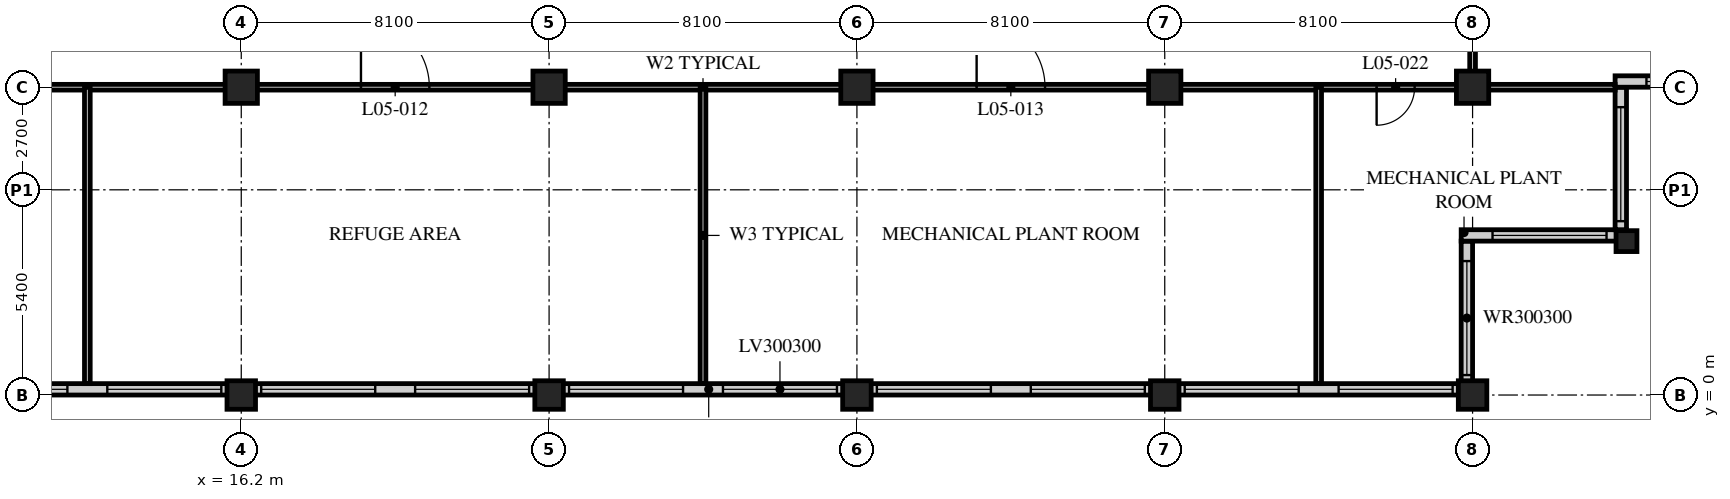
"""IFC4 building model, lengths in metres.
Left out: names, types, materials, properties, quantities, classifications, styles, units other than length and angle.
Written with IfcOpenShell. Run it as: python <this file> out.ifc"""

import sys

from ifc_helpers import new_model, si_unit, direction, frame, frame_2d, origin, origin_2d, place, context, subcontext, project, spatial, rectangle, hollow_rectangle, extrude, element, fill, save


model = new_model("IFC4")
c1 = context("Model", 3, precision=1e-05, world=origin(), true_north=direction((0.0, 1.0)))
c2 = subcontext(c1, "Body", "Model", "MODEL_VIEW")
j1 = project(units=[si_unit("LENGTHUNIT", "METRE"), si_unit("PLANEANGLEUNIT", "RADIAN")], contexts=[c1])
p1 = place(None, origin())
s1 = spatial("IfcSite", under=j1, at=p1, CompositionType="ELEMENT")
p2 = place(p1, origin())
s2 = spatial("IfcBuilding", under=s1, at=p2, CompositionType="ELEMENT")
p3 = place(p2, frame((0.0, 0.0, 27.6)))
s3 = spatial("IfcBuildingStorey", under=s2, at=p3, CompositionType="ELEMENT", Elevation=27.6)
p4 = place(p3, frame((16.2, 0.0, 0.0), z_axis=(0.0, 0.0, 1.0), x_axis=(1.0, 0.0, 0.0)))
e1 = element("IfcColumn", 1, at=p4, inside=s3, PredefinedType="COLUMN", context=c2, shape_type="SweptSolid", body=[
    extrude(hollow_rectangle(XDim=0.75, YDim=0.75, WallThickness=0.07, at=origin_2d()), origin(), (0.0, 0.0, 1.0), 5.4),
])
p5 = place(p3, frame((16.2, 8.1, 0.0), z_axis=(0.0, 0.0, 1.0), x_axis=(1.0, 0.0, 0.0)))
e2 = element("IfcColumn", 2, at=p5, inside=s3, PredefinedType="COLUMN", context=c2, shape_type="SweptSolid", body=[
    extrude(hollow_rectangle(XDim=0.85, YDim=0.85, WallThickness=0.085, at=origin_2d()), origin(), (0.0, 0.0, 1.0), 5.4),
])
p6 = place(p3, frame((24.3, 0.0, 0.0), z_axis=(0.0, 0.0, 1.0), x_axis=(1.0, 0.0, 0.0)))
e3 = element("IfcColumn", 3, at=p6, inside=s3, PredefinedType="COLUMN", context=c2, shape_type="SweptSolid", body=[
    extrude(hollow_rectangle(XDim=0.75, YDim=0.75, WallThickness=0.07, at=origin_2d()), origin(), (0.0, 0.0, 1.0), 5.4),
])
p7 = place(p3, frame((24.3, 8.1, 0.0), z_axis=(0.0, 0.0, 1.0), x_axis=(1.0, 0.0, 0.0)))
e4 = element("IfcColumn", 4, at=p7, inside=s3, PredefinedType="COLUMN", context=c2, shape_type="SweptSolid", body=[
    extrude(hollow_rectangle(XDim=0.85, YDim=0.85, WallThickness=0.085, at=origin_2d()), origin(), (0.0, 0.0, 1.0), 5.4),
])
p8 = place(p3, frame((32.4, 0.0, 0.0), z_axis=(0.0, 0.0, 1.0), x_axis=(1.0, 0.0, 0.0)))
e5 = element("IfcColumn", 5, at=p8, inside=s3, PredefinedType="COLUMN", context=c2, shape_type="SweptSolid", body=[
    extrude(hollow_rectangle(XDim=0.75, YDim=0.75, WallThickness=0.07, at=origin_2d()), origin(), (0.0, 0.0, 1.0), 5.4),
])
p9 = place(p3, frame((32.4, 8.1, 0.0), z_axis=(0.0, 0.0, 1.0), x_axis=(1.0, 0.0, 0.0)))
e6 = element("IfcColumn", 6, at=p9, inside=s3, PredefinedType="COLUMN", context=c2, shape_type="SweptSolid", body=[
    extrude(hollow_rectangle(XDim=0.85, YDim=0.85, WallThickness=0.085, at=origin_2d()), origin(), (0.0, 0.0, 1.0), 5.4),
])
p10 = place(p3, frame((40.5, 0.0, 0.0), z_axis=(0.0, 0.0, 1.0), x_axis=(1.0, 0.0, 0.0)))
e7 = element("IfcColumn", 7, at=p10, inside=s3, PredefinedType="COLUMN", context=c2, shape_type="SweptSolid", body=[
    extrude(hollow_rectangle(XDim=0.75, YDim=0.75, WallThickness=0.07, at=origin_2d()), origin(), (0.0, 0.0, 1.0), 5.4),
])
p11 = place(p3, frame((40.5, 8.1, 0.0), z_axis=(0.0, 0.0, 1.0), x_axis=(1.0, 0.0, 0.0)))
e8 = element("IfcColumn", 8, at=p11, inside=s3, PredefinedType="COLUMN", context=c2, shape_type="SweptSolid", body=[
    extrude(hollow_rectangle(XDim=0.85, YDim=0.85, WallThickness=0.085, at=origin_2d()), origin(), (0.0, 0.0, 1.0), 5.4),
])
p12 = place(p3, frame((48.6, 0.0, 0.0), z_axis=(0.0, 0.0, 1.0), x_axis=(1.0, 0.0, 0.0)))
e9 = element("IfcColumn", 9, at=p12, inside=s3, PredefinedType="COLUMN", context=c2, shape_type="SweptSolid", body=[
    extrude(hollow_rectangle(XDim=0.75, YDim=0.75, WallThickness=0.07, at=origin_2d()), origin(), (0.0, 0.0, 1.0), 5.4),
])
p13 = place(p3, frame((48.6, 8.1, 0.0), z_axis=(0.0, 0.0, 1.0), x_axis=(1.0, 0.0, 0.0)))
e10 = element("IfcColumn", 10, at=p13, inside=s3, PredefinedType="COLUMN", context=c2, shape_type="SweptSolid", body=[
    extrude(hollow_rectangle(XDim=0.85, YDim=0.85, WallThickness=0.085, at=origin_2d()), origin(), (0.0, 0.0, 1.0), 5.4),
])
p14 = place(p3, frame((52.65, 4.05, 0.0), z_axis=(0.0, 0.0, 1.0), x_axis=(1.0, 0.0, 0.0)))
e11 = element("IfcColumn", 11, at=p14, inside=s3, PredefinedType="COLUMN", context=c2, shape_type="SweptSolid", body=[
    extrude(hollow_rectangle(XDim=0.55, YDim=0.55, WallThickness=0.05, at=origin_2d()), origin(), (0.0, 0.0, 1.0), 5.4),
])
p15 = place(p3, frame((8.4, 0.15, 0.0), z_axis=(0.0, 0.0, 1.0), x_axis=(1.0, 0.0, 0.0)))
e12 = element("IfcWall", 12, at=p15, inside=s3, PredefinedType="SOLIDWALL", context=c2, shape_type="SweptSolid", body=[
    extrude(rectangle(XDim=40.2, YDim=0.3, at=frame_2d((20.1, 0.0))), origin(), (0.0, 0.0, 1.0), 5.19),
])
p16 = place(p15, frame((0.225, 0.0, 0.9)))
e13 = element("IfcOpeningElement", 13, at=p16, cuts=e12, PredefinedType="OPENING", context=c2, shape_type="SweptSolid", body=[
    extrude(rectangle(XDim=3.0, YDim=3.0, at=frame_2d((1.5, 1.5))), frame((0.0, 0.16, 0.0), z_axis=(0.0, -1.0, 0.0), x_axis=(1.0, 0.0, 0.0)), (0.0, 0.0, 1.0), 0.32),
])
p17 = place(p15, frame((4.275, 0.0, 0.9)))
e14 = element("IfcOpeningElement", 14, at=p17, cuts=e12, PredefinedType="OPENING", context=c2, shape_type="SweptSolid", body=[
    extrude(rectangle(XDim=3.0, YDim=3.0, at=frame_2d((1.5, 1.5))), frame((0.0, 0.16, 0.0), z_axis=(0.0, -1.0, 0.0), x_axis=(1.0, 0.0, 0.0)), (0.0, 0.0, 1.0), 0.32),
])
p18 = place(p15, frame((8.325, 0.0, 0.9)))
e15 = element("IfcOpeningElement", 15, at=p18, cuts=e12, PredefinedType="OPENING", context=c2, shape_type="SweptSolid", body=[
    extrude(rectangle(XDim=3.0, YDim=3.0, at=frame_2d((1.5, 1.5))), frame((0.0, 0.16, 0.0), z_axis=(0.0, -1.0, 0.0), x_axis=(1.0, 0.0, 0.0)), (0.0, 0.0, 1.0), 0.32),
])
p19 = place(p15, frame((12.375, 0.0, 0.9)))
e16 = element("IfcOpeningElement", 16, at=p19, cuts=e12, PredefinedType="OPENING", context=c2, shape_type="SweptSolid", body=[
    extrude(rectangle(XDim=3.0, YDim=3.0, at=frame_2d((1.5, 1.5))), frame((0.0, 0.16, 0.0), z_axis=(0.0, -1.0, 0.0), x_axis=(1.0, 0.0, 0.0)), (0.0, 0.0, 1.0), 0.32),
])
p20 = place(p15, frame((16.425, 0.0, 0.9)))
e17 = element("IfcOpeningElement", 17, at=p20, cuts=e12, PredefinedType="OPENING", context=c2, shape_type="SweptSolid", body=[
    extrude(rectangle(XDim=3.0, YDim=3.0, at=frame_2d((1.5, 1.5))), frame((0.0, 0.16, 0.0), z_axis=(0.0, -1.0, 0.0), x_axis=(1.0, 0.0, 0.0)), (0.0, 0.0, 1.0), 0.32),
])
p21 = place(p15, frame((20.475, 0.0, 0.9)))
e18 = element("IfcOpeningElement", 18, at=p21, cuts=e12, PredefinedType="OPENING", context=c2, shape_type="SweptSolid", body=[
    extrude(rectangle(XDim=3.0, YDim=3.0, at=frame_2d((1.5, 1.5))), frame((0.0, 0.16, 0.0), z_axis=(0.0, -1.0, 0.0), x_axis=(1.0, 0.0, 0.0)), (0.0, 0.0, 1.0), 0.32),
])
p22 = place(p15, frame((24.525, 0.0, 0.9)))
e19 = element("IfcOpeningElement", 19, at=p22, cuts=e12, PredefinedType="OPENING", context=c2, shape_type="SweptSolid", body=[
    extrude(rectangle(XDim=3.0, YDim=3.0, at=frame_2d((1.5, 1.5))), frame((0.0, 0.16, 0.0), z_axis=(0.0, -1.0, 0.0), x_axis=(1.0, 0.0, 0.0)), (0.0, 0.0, 1.0), 0.32),
])
p23 = place(p15, frame((28.575, 0.0, 0.9)))
e20 = element("IfcOpeningElement", 20, at=p23, cuts=e12, PredefinedType="OPENING", context=c2, shape_type="SweptSolid", body=[
    extrude(rectangle(XDim=3.0, YDim=3.0, at=frame_2d((1.5, 1.5))), frame((0.0, 0.16, 0.0), z_axis=(0.0, -1.0, 0.0), x_axis=(1.0, 0.0, 0.0)), (0.0, 0.0, 1.0), 0.32),
])
p24 = place(p15, frame((32.625, 0.0, 0.9)))
e21 = element("IfcOpeningElement", 21, at=p24, cuts=e12, PredefinedType="OPENING", context=c2, shape_type="SweptSolid", body=[
    extrude(rectangle(XDim=3.0, YDim=3.0, at=frame_2d((1.5, 1.5))), frame((0.0, 0.16, 0.0), z_axis=(0.0, -1.0, 0.0), x_axis=(1.0, 0.0, 0.0)), (0.0, 0.0, 1.0), 0.32),
])
p25 = place(p15, frame((36.675, 0.0, 0.9)))
e22 = element("IfcOpeningElement", 22, at=p25, cuts=e12, PredefinedType="OPENING", context=c2, shape_type="SweptSolid", body=[
    extrude(rectangle(XDim=3.0, YDim=3.0, at=frame_2d((1.5, 1.5))), frame((0.0, 0.16, 0.0), z_axis=(0.0, -1.0, 0.0), x_axis=(1.0, 0.0, 0.0)), (0.0, 0.0, 1.0), 0.32),
])
p26 = place(p3, frame((48.45, 0.3, 0.0), z_axis=(0.0, 0.0, 1.0), x_axis=(0.0, 1.0, 0.0)))
e23 = element("IfcWall", 23, at=p26, inside=s3, PredefinedType="SOLIDWALL", context=c2, shape_type="SweptSolid", body=[
    extrude(rectangle(XDim=3.75, YDim=0.3, at=frame_2d((1.875, 0.0))), origin(), (0.0, 0.0, 1.0), 5.19),
])
p27 = place(p26, frame((0.225, 0.0, 0.9)))
e24 = element("IfcOpeningElement", 24, at=p27, cuts=e23, PredefinedType="OPENING", context=c2, shape_type="SweptSolid", body=[
    extrude(rectangle(XDim=3.0, YDim=3.0, at=frame_2d((1.5, 1.5))), frame((0.0, 0.16, 0.0), z_axis=(0.0, -1.0, 0.0), x_axis=(1.0, 0.0, 0.0)), (0.0, 0.0, 1.0), 0.32),
])
p28 = place(p3, frame((48.3, 4.2, 0.0), z_axis=(0.0, 0.0, 1.0), x_axis=(1.0, 0.0, 0.0)))
e25 = element("IfcWall", 25, at=p28, inside=s3, PredefinedType="SOLIDWALL", context=c2, shape_type="SweptSolid", body=[
    extrude(rectangle(XDim=4.35, YDim=0.3, at=frame_2d((2.175, 0.0))), origin(), (0.0, 0.0, 1.0), 5.19),
])
p29 = place(p28, frame((0.825, 0.0, 0.9)))
e26 = element("IfcOpeningElement", 26, at=p29, cuts=e25, PredefinedType="OPENING", context=c2, shape_type="SweptSolid", body=[
    extrude(rectangle(XDim=3.0, YDim=3.0, at=frame_2d((1.5, 1.5))), frame((0.0, 0.16, 0.0), z_axis=(0.0, -1.0, 0.0), x_axis=(1.0, 0.0, 0.0)), (0.0, 0.0, 1.0), 0.32),
])
p30 = place(p3, frame((52.5, 4.35, 0.0), z_axis=(0.0, 0.0, 1.0), x_axis=(0.0, 1.0, 0.0)))
e27 = element("IfcWall", 27, at=p30, inside=s3, PredefinedType="SOLIDWALL", context=c2, shape_type="SweptSolid", body=[
    extrude(rectangle(XDim=3.75, YDim=0.3, at=frame_2d((1.875, 0.0))), origin(), (0.0, 0.0, 1.0), 5.19),
])
p31 = place(p30, frame((0.225, 0.0, 0.9)))
e28 = element("IfcOpeningElement", 28, at=p31, cuts=e27, PredefinedType="OPENING", context=c2, shape_type="SweptSolid", body=[
    extrude(rectangle(XDim=3.0, YDim=3.0, at=frame_2d((1.5, 1.5))), frame((0.0, 0.16, 0.0), z_axis=(0.0, -1.0, 0.0), x_axis=(1.0, 0.0, 0.0)), (0.0, 0.0, 1.0), 0.32),
])
p32 = place(p3, frame((52.35, 8.25, 0.0), z_axis=(0.0, 0.0, 1.0), x_axis=(1.0, 0.0, 0.0)))
e29 = element("IfcWall", 29, at=p32, inside=s3, PredefinedType="SOLIDWALL", context=c2, shape_type="SweptSolid", body=[
    extrude(rectangle(XDim=4.35, YDim=0.3, at=frame_2d((2.175, 0.0))), origin(), (0.0, 0.0, 1.0), 5.19),
])
p33 = place(p32, frame((0.825, 0.0, 0.9)))
e30 = element("IfcOpeningElement", 30, at=p33, cuts=e29, PredefinedType="OPENING", context=c2, shape_type="SweptSolid", body=[
    extrude(rectangle(XDim=3.0, YDim=3.0, at=frame_2d((1.5, 1.5))), frame((0.0, 0.16, 0.0), z_axis=(0.0, -1.0, 0.0), x_axis=(1.0, 0.0, 0.0)), (0.0, 0.0, 1.0), 0.32),
])
p34 = place(p3, frame((8.1, 8.1, 0.0), z_axis=(0.0, 0.0, 1.0), x_axis=(1.0, 0.0, 0.0)))
e31 = element("IfcWall", 31, at=p34, inside=s3, PredefinedType="PARTITIONING", context=c2, shape_type="SweptSolid", body=[
    extrude(rectangle(XDim=40.5, YDim=0.15, at=frame_2d((20.25, 0.0))), origin(), (0.0, 0.0, 1.0), 4.578),
])
p35 = place(p34, frame((11.25, 0.0, 0.0)))
e32 = element("IfcOpeningElement", 32, at=p35, cuts=e31, PredefinedType="OPENING", context=c2, shape_type="SweptSolid", body=[
    extrude(rectangle(XDim=1.8, YDim=2.4, at=frame_2d((0.9, 1.2))), frame((0.0, 0.085, 0.0), z_axis=(0.0, -1.0, 0.0), x_axis=(1.0, 0.0, 0.0)), (0.0, 0.0, 1.0), 0.17),
])
p36 = place(p34, frame((27.45, 0.0, 0.0)))
e33 = element("IfcOpeningElement", 33, at=p36, cuts=e31, PredefinedType="OPENING", context=c2, shape_type="SweptSolid", body=[
    extrude(rectangle(XDim=1.8, YDim=2.4, at=frame_2d((0.9, 1.2))), frame((0.0, 0.085, 0.0), z_axis=(0.0, -1.0, 0.0), x_axis=(1.0, 0.0, 0.0)), (0.0, 0.0, 1.0), 0.17),
])
p37 = place(p34, frame((1.525, 0.0, 0.0)))
e34 = element("IfcOpeningElement", 34, at=p37, cuts=e31, PredefinedType="OPENING", context=c2, shape_type="SweptSolid", body=[
    extrude(rectangle(XDim=1.0, YDim=2.1, at=frame_2d((0.5, 1.05))), frame((0.0, 0.085, 0.0), z_axis=(0.0, -1.0, 0.0), x_axis=(1.0, 0.0, 0.0)), (0.0, 0.0, 1.0), 0.17),
])
p38 = place(p34, frame((37.975, 0.0, 0.0)))
e35 = element("IfcOpeningElement", 35, at=p38, cuts=e31, PredefinedType="OPENING", context=c2, shape_type="SweptSolid", body=[
    extrude(rectangle(XDim=1.0, YDim=2.1, at=frame_2d((0.5, 1.05))), frame((0.0, 0.085, 0.0), z_axis=(0.0, -1.0, 0.0), x_axis=(1.0, 0.0, 0.0)), (0.0, 0.0, 1.0), 0.17),
])
p39 = place(p3, frame((48.6, 8.1, 0.0), z_axis=(0.0, 0.0, 1.0), x_axis=(0.0, 1.0, 0.0)))
e36 = element("IfcWall", 36, at=p39, inside=s3, PredefinedType="PARTITIONING", context=c2, shape_type="SweptSolid", body=[
    extrude(rectangle(XDim=34.35, YDim=0.15, at=frame_2d((17.175, 0.0))), origin(), (0.0, 0.0, 1.0), 4.578),
])
p40 = place(p39, frame((8.95, 0.0, 0.0)))
e37 = element("IfcOpeningElement", 37, at=p40, cuts=e36, PredefinedType="OPENING", context=c2, shape_type="SweptSolid", body=[
    extrude(rectangle(XDim=1.8, YDim=2.4, at=frame_2d((0.9, 1.2))), frame((0.0, 0.085, 0.0), z_axis=(0.0, -1.0, 0.0), x_axis=(1.0, 0.0, 0.0)), (0.0, 0.0, 1.0), 0.17),
])
p41 = place(p39, frame((25.125, 0.0, 0.0)))
e38 = element("IfcOpeningElement", 38, at=p41, cuts=e36, PredefinedType="OPENING", context=c2, shape_type="SweptSolid", body=[
    extrude(rectangle(XDim=1.8, YDim=2.4, at=frame_2d((0.9, 1.2))), frame((0.0, 0.085, 0.0), z_axis=(0.0, -1.0, 0.0), x_axis=(1.0, 0.0, 0.0)), (0.0, 0.0, 1.0), 0.17),
])
for number, where, z_axis, x_axis in (
    (39, (28.35, 8.1, 0.0), (0.0, 0.0, 1.0), (0.0, -1.0, 0.0)),
    (40, (12.15, 8.1, 0.0), (0.0, 0.0, 1.0), (0.0, -1.0, 0.0)),
):
    element("IfcWall", number, at=place(p3, frame(where, z_axis=z_axis, x_axis=x_axis)), inside=s3, PredefinedType="PARTITIONING", context=c2, shape_type="SweptSolid", body=[
        extrude(rectangle(XDim=7.8, YDim=0.15, at=frame_2d((3.9, 0.0))), origin(), (0.0, 0.0, 1.0), 5.19),
    ])
p42 = place(p3, frame((48.6, 8.1, 0.0), z_axis=(0.0, 0.0, 1.0), x_axis=(1.0, 0.0, 0.0)))
e41 = element("IfcWall", 41, at=p42, inside=s3, PredefinedType="PARTITIONING", context=c2, shape_type="SweptSolid", body=[
    extrude(rectangle(XDim=3.75, YDim=0.15, at=frame_2d((1.875, 0.0))), origin(), (0.0, 0.0, 1.0), 4.578),
])
p43 = place(p3, frame((44.55, 8.1, 0.0), z_axis=(0.0, 0.0, 1.0), x_axis=(0.0, -1.0, 0.0)))
e42 = element("IfcWall", 42, at=p43, inside=s3, PredefinedType="PARTITIONING", context=c2, shape_type="SweptSolid", body=[
    extrude(rectangle(XDim=7.8, YDim=0.15, at=frame_2d((3.9, 0.0))), origin(), (0.0, 0.0, 1.0), 5.19),
])
p44 = place(p16, origin())
e43 = element("IfcWindow", 43, at=p44, inside=s3, PartitioningType="SINGLE_PANEL", PredefinedType="USERDEFINED", context=c2, shape_type="SweptSolid", body=[
    extrude(rectangle(XDim=3.0, YDim=3.0, at=frame_2d((1.5, 1.5))), frame((0.0, 0.075, 0.0), z_axis=(0.0, -1.0, 0.0), x_axis=(1.0, 0.0, 0.0)), (0.0, 0.0, 1.0), 0.15),
])
fill(e13, e43)
p45 = place(p17, origin())
e44 = element("IfcWindow", 44, at=p45, inside=s3, PartitioningType="SINGLE_PANEL", PredefinedType="USERDEFINED", context=c2, shape_type="SweptSolid", body=[
    extrude(rectangle(XDim=3.0, YDim=3.0, at=frame_2d((1.5, 1.5))), frame((0.0, 0.075, 0.0), z_axis=(0.0, -1.0, 0.0), x_axis=(1.0, 0.0, 0.0)), (0.0, 0.0, 1.0), 0.15),
])
fill(e14, e44)
p46 = place(p18, origin())
e45 = element("IfcWindow", 45, at=p46, inside=s3, PartitioningType="SINGLE_PANEL", PredefinedType="USERDEFINED", context=c2, shape_type="SweptSolid", body=[
    extrude(rectangle(XDim=3.0, YDim=3.0, at=frame_2d((1.5, 1.5))), frame((0.0, 0.075, 0.0), z_axis=(0.0, -1.0, 0.0), x_axis=(1.0, 0.0, 0.0)), (0.0, 0.0, 1.0), 0.15),
])
fill(e15, e45)
p47 = place(p19, origin())
e46 = element("IfcWindow", 46, at=p47, inside=s3, PartitioningType="SINGLE_PANEL", PredefinedType="USERDEFINED", context=c2, shape_type="SweptSolid", body=[
    extrude(rectangle(XDim=3.0, YDim=3.0, at=frame_2d((1.5, 1.5))), frame((0.0, 0.075, 0.0), z_axis=(0.0, -1.0, 0.0), x_axis=(1.0, 0.0, 0.0)), (0.0, 0.0, 1.0), 0.15),
])
fill(e16, e46)
p48 = place(p20, origin())
e47 = element("IfcWindow", 47, at=p48, inside=s3, PartitioningType="SINGLE_PANEL", PredefinedType="USERDEFINED", context=c2, shape_type="SweptSolid", body=[
    extrude(rectangle(XDim=3.0, YDim=3.0, at=frame_2d((1.5, 1.5))), frame((0.0, 0.075, 0.0), z_axis=(0.0, -1.0, 0.0), x_axis=(1.0, 0.0, 0.0)), (0.0, 0.0, 1.0), 0.15),
])
fill(e17, e47)
p49 = place(p21, origin())
e48 = element("IfcWindow", 48, at=p49, inside=s3, PartitioningType="SINGLE_PANEL", PredefinedType="USERDEFINED", context=c2, shape_type="SweptSolid", body=[
    extrude(rectangle(XDim=3.0, YDim=3.0, at=frame_2d((1.5, 1.5))), frame((0.0, 0.075, 0.0), z_axis=(0.0, -1.0, 0.0), x_axis=(1.0, 0.0, 0.0)), (0.0, 0.0, 1.0), 0.15),
])
fill(e18, e48)
p50 = place(p22, origin())
e49 = element("IfcWindow", 49, at=p50, inside=s3, PartitioningType="SINGLE_PANEL", PredefinedType="USERDEFINED", context=c2, shape_type="SweptSolid", body=[
    extrude(rectangle(XDim=3.0, YDim=3.0, at=frame_2d((1.5, 1.5))), frame((0.0, 0.075, 0.0), z_axis=(0.0, -1.0, 0.0), x_axis=(1.0, 0.0, 0.0)), (0.0, 0.0, 1.0), 0.15),
])
fill(e19, e49)
p51 = place(p23, origin())
e50 = element("IfcWindow", 50, at=p51, inside=s3, PartitioningType="SINGLE_PANEL", PredefinedType="USERDEFINED", context=c2, shape_type="SweptSolid", body=[
    extrude(rectangle(XDim=3.0, YDim=3.0, at=frame_2d((1.5, 1.5))), frame((0.0, 0.075, 0.0), z_axis=(0.0, -1.0, 0.0), x_axis=(1.0, 0.0, 0.0)), (0.0, 0.0, 1.0), 0.15),
])
fill(e20, e50)
p52 = place(p24, origin())
e51 = element("IfcWindow", 51, at=p52, inside=s3, PartitioningType="SINGLE_PANEL", PredefinedType="USERDEFINED", context=c2, shape_type="SweptSolid", body=[
    extrude(rectangle(XDim=3.0, YDim=3.0, at=frame_2d((1.5, 1.5))), frame((0.0, 0.075, 0.0), z_axis=(0.0, -1.0, 0.0), x_axis=(1.0, 0.0, 0.0)), (0.0, 0.0, 1.0), 0.15),
])
fill(e21, e51)
p53 = place(p25, origin())
e52 = element("IfcWindow", 52, at=p53, inside=s3, PartitioningType="SINGLE_PANEL", PredefinedType="USERDEFINED", context=c2, shape_type="SweptSolid", body=[
    extrude(rectangle(XDim=3.0, YDim=3.0, at=frame_2d((1.5, 1.5))), frame((0.0, 0.075, 0.0), z_axis=(0.0, -1.0, 0.0), x_axis=(1.0, 0.0, 0.0)), (0.0, 0.0, 1.0), 0.15),
])
fill(e22, e52)
p54 = place(p27, origin())
e53 = element("IfcWindow", 53, at=p54, inside=s3, PartitioningType="SINGLE_PANEL", PredefinedType="WINDOW", context=c2, shape_type="SweptSolid", body=[
    extrude(rectangle(XDim=3.0, YDim=3.0, at=frame_2d((1.5, 1.5))), frame((0.0, 0.03, 0.0), z_axis=(0.0, -1.0, 0.0), x_axis=(1.0, 0.0, 0.0)), (0.0, 0.0, 1.0), 0.06),
])
fill(e24, e53)
p55 = place(p29, origin())
e54 = element("IfcWindow", 54, at=p55, inside=s3, PartitioningType="SINGLE_PANEL", PredefinedType="WINDOW", context=c2, shape_type="SweptSolid", body=[
    extrude(rectangle(XDim=3.0, YDim=3.0, at=frame_2d((1.5, 1.5))), frame((0.0, 0.03, 0.0), z_axis=(0.0, -1.0, 0.0), x_axis=(1.0, 0.0, 0.0)), (0.0, 0.0, 1.0), 0.06),
])
fill(e26, e54)
p56 = place(p31, origin())
e55 = element("IfcWindow", 55, at=p56, inside=s3, PartitioningType="SINGLE_PANEL", PredefinedType="WINDOW", context=c2, shape_type="SweptSolid", body=[
    extrude(rectangle(XDim=3.0, YDim=3.0, at=frame_2d((1.5, 1.5))), frame((0.0, 0.03, 0.0), z_axis=(0.0, -1.0, 0.0), x_axis=(1.0, 0.0, 0.0)), (0.0, 0.0, 1.0), 0.06),
])
fill(e28, e55)
p57 = place(p33, origin())
e56 = element("IfcWindow", 56, at=p57, inside=s3, PartitioningType="SINGLE_PANEL", PredefinedType="WINDOW", context=c2, shape_type="SweptSolid", body=[
    extrude(rectangle(XDim=3.0, YDim=3.0, at=frame_2d((1.5, 1.5))), frame((0.0, 0.03, 0.0), z_axis=(0.0, -1.0, 0.0), x_axis=(1.0, 0.0, 0.0)), (0.0, 0.0, 1.0), 0.06),
])
fill(e30, e56)
p58 = place(p35, origin())
e57 = element("IfcDoor", 57, at=p58, inside=s3, OperationType="DOUBLE_DOOR_SINGLE_SWING", PredefinedType="DOOR", context=c2, shape_type="SweptSolid", body=[
    extrude(rectangle(XDim=1.8, YDim=2.4, at=frame_2d((0.9, 1.2))), frame((0.0, 0.025, 0.0), z_axis=(0.0, -1.0, 0.0), x_axis=(1.0, 0.0, 0.0)), (0.0, 0.0, 1.0), 0.05),
])
fill(e32, e57)
p59 = place(p36, origin())
e58 = element("IfcDoor", 58, at=p59, inside=s3, OperationType="DOUBLE_DOOR_SINGLE_SWING", PredefinedType="DOOR", context=c2, shape_type="SweptSolid", body=[
    extrude(rectangle(XDim=1.8, YDim=2.4, at=frame_2d((0.9, 1.2))), frame((0.0, 0.025, 0.0), z_axis=(0.0, -1.0, 0.0), x_axis=(1.0, 0.0, 0.0)), (0.0, 0.0, 1.0), 0.05),
])
fill(e33, e58)
p60 = place(p38, origin())
e59 = element("IfcDoor", 59, at=p60, inside=s3, OperationType="SINGLE_SWING_RIGHT", PredefinedType="DOOR", context=c2, shape_type="SweptSolid", body=[
    extrude(rectangle(XDim=1.0, YDim=2.1, at=frame_2d((0.5, 1.05))), frame((0.0, 0.025, 0.0), z_axis=(0.0, -1.0, 0.0), x_axis=(1.0, 0.0, 0.0)), (0.0, 0.0, 1.0), 0.05),
])
fill(e35, e59)
save(model, sys.argv[1])
